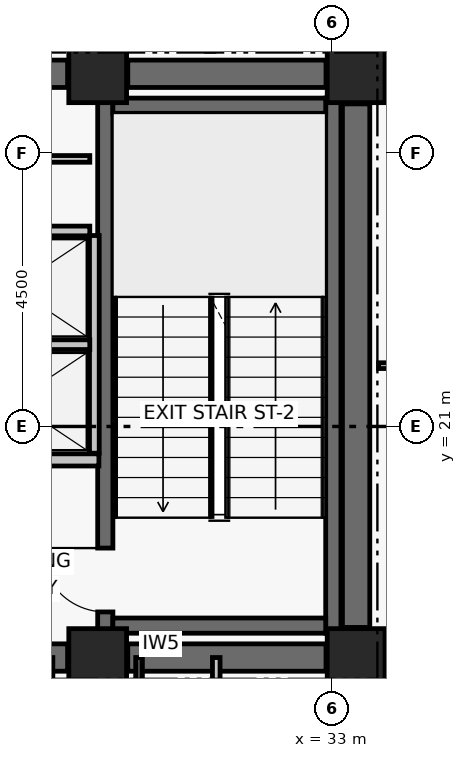
"""IFC4 building model, lengths in metres.
Left out: names, types, materials, properties, quantities, classifications, styles, units other than length and angle.
Written with IfcOpenShell. Run it as: python <this file> out.ifc"""

import sys

from ifc_helpers import new_model, si_unit, direction, frame, frame_2d, origin, origin_2d, place, context, subcontext, project, spatial, rectangle, extrude, element, fill, save


model = new_model("IFC4")
c1 = context("Model", 3, precision=1e-05, world=origin(), true_north=direction((0.0, 1.0)))
c2 = subcontext(c1, "Body", "Model", "MODEL_VIEW")
j1 = project(units=[si_unit("LENGTHUNIT", "METRE"), si_unit("PLANEANGLEUNIT", "RADIAN")], contexts=[c1])
p1 = place(None, origin())
s1 = spatial("IfcSite", under=j1, at=p1, CompositionType="ELEMENT")
p2 = place(p1, origin())
s2 = spatial("IfcBuilding", under=s1, at=p2, CompositionType="ELEMENT")
p3 = place(p2, frame((0.0, 0.0, 295.5)))
s3 = spatial("IfcBuildingStorey", under=s2, at=p3, CompositionType="ELEMENT", Elevation=295.5)
for number, where, z_axis, x_axis in (
    (1, (29.15, 17.2, 0.0), (0.0, 0.0, 1.0), (1.0, 0.0, 0.0)),
    (2, (33.4, 17.2, 0.0), (0.0, 0.0, 1.0), (1.0, 0.0, 0.0)),
    (3, (29.15, 26.8, 0.0), (0.0, 0.0, 1.0), (1.0, 0.0, 0.0)),
    (4, (33.4, 26.8, 0.0), (0.0, 0.0, 1.0), (1.0, 0.0, 0.0)),
):
    element("IfcColumn", number, at=place(p3, frame(where, z_axis=z_axis, x_axis=x_axis)), inside=s3, PredefinedType="COLUMN", context=c2, shape_type="SweptSolid", body=[
        extrude(rectangle(XDim=0.95, YDim=0.95, at=origin_2d()), origin(), (0.0, 0.0, 1.0), 3.72),
    ])
p4 = place(p3, frame((26.85, 17.2, 0.0), z_axis=(0.0, 0.0, 1.0), x_axis=(1.0, 0.0, 0.0)))
e5 = element("IfcWall", 5, at=p4, inside=s3, PredefinedType="SHEAR", context=c2, shape_type="SweptSolid", body=[
    extrude(rectangle(XDim=1.805, YDim=0.45, at=frame_2d((0.902, 0.0))), origin(), (0.0, 0.0, 1.0), 3.44),
])
p5 = place(p3, frame((29.645, 17.2, 0.0), z_axis=(0.0, 0.0, 1.0), x_axis=(1.0, 0.0, 0.0)))
e6 = element("IfcWall", 6, at=p5, inside=s3, PredefinedType="SHEAR", context=c2, shape_type="SweptSolid", body=[
    extrude(rectangle(XDim=3.26, YDim=0.45, at=frame_2d((1.63, 0.0))), origin(), (0.0, 0.0, 1.0), 3.44),
])
p6 = place(p3, frame((26.85, 26.8, 0.0), z_axis=(0.0, 0.0, 1.0), x_axis=(1.0, 0.0, 0.0)))
e7 = element("IfcWall", 7, at=p6, inside=s3, PredefinedType="SHEAR", context=c2, shape_type="SweptSolid", body=[
    extrude(rectangle(XDim=1.805, YDim=0.45, at=frame_2d((0.902, 0.0))), origin(), (0.0, 0.0, 1.0), 3.44),
])
p7 = place(p3, frame((29.645, 26.8, 0.0), z_axis=(0.0, 0.0, 1.0), x_axis=(1.0, 0.0, 0.0)))
e8 = element("IfcWall", 8, at=p7, inside=s3, PredefinedType="SHEAR", context=c2, shape_type="SweptSolid", body=[
    extrude(rectangle(XDim=3.26, YDim=0.45, at=frame_2d((1.63, 0.0))), origin(), (0.0, 0.0, 1.0), 3.44),
])
p8 = place(p3, frame((33.4, 17.695, 0.0), z_axis=(0.0, 0.0, 1.0), x_axis=(0.0, 1.0, 0.0)))
e9 = element("IfcWall", 9, at=p8, inside=s3, PredefinedType="SHEAR", context=c2, shape_type="SweptSolid", body=[
    extrude(rectangle(XDim=8.61, YDim=0.45, at=frame_2d((4.305, 0.0))), origin(), (0.0, 0.0, 1.0), 3.44),
])
p9 = place(p3, frame((29.275, 17.6, 0.0), z_axis=(0.0, 0.0, 1.0), x_axis=(0.0, 1.0, 0.0)))
e10 = element("IfcWall", 10, at=p9, inside=s3, PredefinedType="SHEAR", context=c2, shape_type="SweptSolid", body=[
    extrude(rectangle(XDim=8.8, YDim=0.25, at=frame_2d((4.4, 0.0))), origin(), (0.0, 0.0, 1.0), 3.44),
])
p10 = place(p9, frame((0.35, 0.0, 0.0)))
e11 = element("IfcOpeningElement", 11, at=p10, cuts=e10, PredefinedType="OPENING", context=c2, shape_type="SweptSolid", body=[
    extrude(rectangle(XDim=1.05, YDim=2.08, at=frame_2d((0.525, 1.04))), frame((0.0, 0.135, 0.0), z_axis=(0.0, -1.0, 0.0), x_axis=(1.0, 0.0, 0.0)), (0.0, 0.0, 1.0), 0.27),
])
p11 = place(p3, frame((33.025, 17.6, 0.0), z_axis=(0.0, 0.0, 1.0), x_axis=(0.0, 1.0, 0.0)))
e12 = element("IfcWall", 12, at=p11, inside=s3, PredefinedType="SHEAR", context=c2, shape_type="SweptSolid", body=[
    extrude(rectangle(XDim=8.8, YDim=0.25, at=frame_2d((4.4, 0.0))), origin(), (0.0, 0.0, 1.0), 3.44),
])
for number, where, z_axis, x_axis in (
    (13, (29.4, 17.725, 0.0), (0.0, 0.0, 1.0), (1.0, 0.0, 0.0)),
    (14, (29.4, 26.275, 0.0), (0.0, 0.0, 1.0), (1.0, 0.0, 0.0)),
):
    element("IfcWall", number, at=place(p3, frame(where, z_axis=z_axis, x_axis=x_axis)), inside=s3, PredefinedType="SHEAR", context=c2, shape_type="SweptSolid", body=[
        extrude(rectangle(XDim=3.5, YDim=0.25, at=frame_2d((1.75, 0.0))), origin(), (0.0, 0.0, 1.0), 3.44),
    ])
p12 = place(p3, frame((26.37, 20.45, 0.0), z_axis=(0.0, 0.0, 1.0), x_axis=(1.0, 0.0, 0.0)))
e15 = element("IfcWall", 15, at=p12, inside=s3, PredefinedType="PARTITIONING", context=c2, shape_type="SweptSolid", body=[
    extrude(rectangle(XDim=2.8, YDim=0.2, at=frame_2d((1.4, 0.0))), origin(), (0.0, 0.0, 1.0), 3.44),
])
p13 = place(p12, frame((0.78, 0.0, 0.0)))
e16 = element("IfcOpeningElement", 16, at=p13, cuts=e15, PredefinedType="OPENING", context=c2, shape_type="SweptSolid", body=[
    extrude(rectangle(XDim=1.1, YDim=2.08, at=frame_2d((0.55, 1.04))), frame((0.0, 0.11, 0.0), z_axis=(0.0, -1.0, 0.0), x_axis=(1.0, 0.0, 0.0)), (0.0, 0.0, 1.0), 0.22),
])
p14 = place(p3, frame((29.095, 20.56, 0.0), z_axis=(0.0, 0.0, 1.0), x_axis=(0.0, 1.0, 0.0)))
e17 = element("IfcWall", 17, at=p14, inside=s3, PredefinedType="PARTITIONING", context=c2, shape_type="SweptSolid", body=[
    extrude(rectangle(XDim=3.58, YDim=0.16, at=frame_2d((1.79, 0.0))), origin(), (0.0, 0.0, 1.0), 3.44),
])
p15 = place(p3, frame((26.37, 22.345, 0.0), z_axis=(0.0, 0.0, 1.0), x_axis=(1.0, 0.0, 0.0)))
e18 = element("IfcWall", 18, at=p15, inside=s3, PredefinedType="PARTITIONING", context=c2, shape_type="SweptSolid", body=[
    extrude(rectangle(XDim=2.65, YDim=0.16, at=frame_2d((1.325, 0.0))), origin(), (0.0, 0.0, 1.0), 3.44),
])
p16 = place(p3, frame((26.53, 24.215, 0.0), z_axis=(0.0, 0.0, 1.0), x_axis=(1.0, 0.0, 0.0)))
e19 = element("IfcWall", 19, at=p16, inside=s3, PredefinedType="PARTITIONING", context=c2, shape_type="SweptSolid", body=[
    extrude(rectangle(XDim=2.49, YDim=0.16, at=frame_2d((1.245, 0.0))), origin(), (0.0, 0.0, 1.0), 3.44),
])
p17 = place(p3, frame((24.26, 25.4, 0.0), z_axis=(0.0, 0.0, 1.0), x_axis=(1.0, 0.0, 0.0)))
e20 = element("IfcWall", 20, at=p17, inside=s3, PredefinedType="PARTITIONING", context=c2, shape_type="SweptSolid", body=[
    extrude(rectangle(XDim=4.76, YDim=0.11, at=frame_2d((2.38, 0.0))), origin(), (0.0, 0.0, 1.0), 3.44),
])
p18 = place(p3, frame((28.35, 14.95, 0.0), z_axis=(0.0, 0.0, 1.0), x_axis=(0.0, 1.0, 0.0)))
e21 = element("IfcWall", 21, at=p18, inside=s3, PredefinedType="PARTITIONING", context=c2, shape_type="SweptSolid", body=[
    extrude(rectangle(XDim=2.25, YDim=0.125, at=frame_2d((1.125, 0.0))), origin(), (0.0, 0.0, 1.0), 2.57),
])
p19 = place(p3, frame((29.83, 14.95, 0.0), z_axis=(0.0, 0.0, 1.0), x_axis=(0.0, 1.0, 0.0)))
e22 = element("IfcWall", 22, at=p19, inside=s3, PredefinedType="PARTITIONING", context=c2, shape_type="SweptSolid", body=[
    extrude(rectangle(XDim=2.25, YDim=0.11, at=frame_2d((1.125, 0.0))), origin(), (0.0, 0.0, 1.0), 2.57),
])
p20 = place(p3, frame((31.1, 14.95, 0.0), z_axis=(0.0, 0.0, 1.0), x_axis=(0.0, 1.0, 0.0)))
e23 = element("IfcWall", 23, at=p20, inside=s3, PredefinedType="PARTITIONING", context=c2, shape_type="SweptSolid", body=[
    extrude(rectangle(XDim=2.25, YDim=0.125, at=frame_2d((1.125, 0.0))), origin(), (0.0, 0.0, 1.0), 2.57),
])
p21 = place(p3, frame((33.77, 22.0, 0.0), z_axis=(0.0, 0.0, 1.0), x_axis=(1.0, 0.0, 0.0)))
e24 = element("IfcWall", 24, at=p21, inside=s3, PredefinedType="PARTITIONING", context=c2, shape_type="SweptSolid", body=[
    extrude(rectangle(XDim=7.412, YDim=0.095, at=frame_2d((3.706, 0.0))), origin(), (0.0, 0.0, 1.0), 2.17),
])
p22 = place(p21, frame((0.28, 0.0, 0.0)))
e25 = element("IfcOpeningElement", 25, at=p22, cuts=e24, PredefinedType="OPENING", context=c2, shape_type="SweptSolid", body=[
    extrude(rectangle(XDim=0.92, YDim=2.05, at=frame_2d((0.46, 1.025))), frame((0.0, 0.057, 0.0), z_axis=(0.0, -1.0, 0.0), x_axis=(1.0, 0.0, 0.0)), (0.0, 0.0, 1.0), 0.115),
])
p23 = place(p10, origin())
e26 = element("IfcDoor", 26, at=p23, inside=s3, OperationType="SINGLE_SWING_RIGHT", PredefinedType="DOOR", context=c2, shape_type="SweptSolid", body=[
    extrude(rectangle(XDim=1.05, YDim=2.08, at=frame_2d((0.525, 1.04))), frame((0.0, 0.025, 0.0), z_axis=(0.0, -1.0, 0.0), x_axis=(1.0, 0.0, 0.0)), (0.0, 0.0, 1.0), 0.05),
])
fill(e11, e26)
save(model, sys.argv[1])
